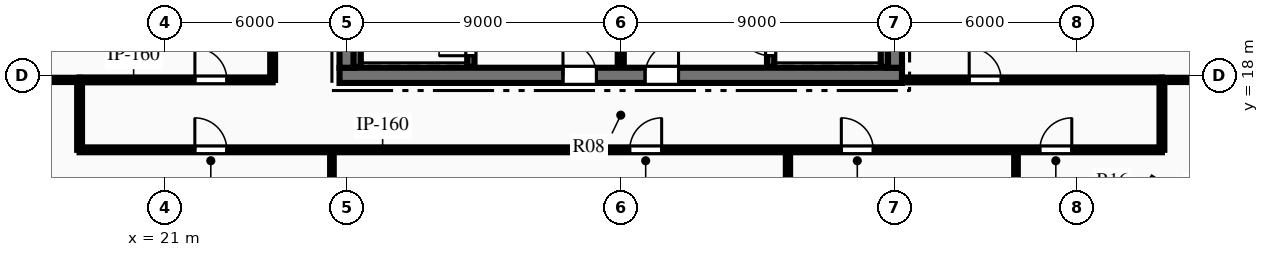
"""IFC4 building model, lengths in metres.
Left out: names, types, materials, properties, quantities, classifications, styles, units other than length and angle.
Written with IfcOpenShell. Run it as: python <this file> out.ifc"""

import sys

from ifc_helpers import new_model, si_unit, direction, frame, frame_2d, origin, place, context, subcontext, project, spatial, rectangle, extrude, element, fill, save


model = new_model("IFC4")
c1 = context("Model", 3, precision=1e-05, world=origin(), true_north=direction((0.0, 1.0)))
c2 = subcontext(c1, "Body", "Model", "MODEL_VIEW")
j1 = project(units=[si_unit("LENGTHUNIT", "METRE"), si_unit("PLANEANGLEUNIT", "RADIAN")], contexts=[c1])
p1 = place(None, origin())
s1 = spatial("IfcSite", under=j1, at=p1, CompositionType="ELEMENT")
p2 = place(p1, origin())
s2 = spatial("IfcBuilding", under=s1, at=p2, CompositionType="ELEMENT")
p3 = place(p2, frame((0.0, 0.0, 220.95)))
s3 = spatial("IfcBuildingStorey", under=s2, at=p3, CompositionType="ELEMENT", Elevation=220.95)
p4 = place(p3, frame((26.75, 18.0, 0.0), z_axis=(0.0, 0.0, 1.0), x_axis=(1.0, 0.0, 0.0)))
e1 = element("IfcWall", 1, at=p4, inside=s3, PredefinedType="SHEAR", context=c2, shape_type="SweptSolid", body=[
    extrude(rectangle(XDim=18.5, YDim=0.5, at=frame_2d((9.25, 0.0))), origin(), (0.0, 0.0, 1.0), 3.75),
])
p5 = place(p4, frame((7.35, 0.0, 0.0)))
e2 = element("IfcOpeningElement", 2, at=p5, cuts=e1, PredefinedType="OPENING", context=c2, shape_type="SweptSolid", body=[
    extrude(rectangle(XDim=1.1, YDim=2.15, at=frame_2d((0.55, 1.075))), frame((0.0, 0.26, 0.0), z_axis=(0.0, -1.0, 0.0), x_axis=(1.0, 0.0, 0.0)), (0.0, 0.0, 1.0), 0.52),
])
p6 = place(p4, frame((10.05, 0.0, 0.0)))
e3 = element("IfcOpeningElement", 3, at=p6, cuts=e1, PredefinedType="OPENING", context=c2, shape_type="SweptSolid", body=[
    extrude(rectangle(XDim=1.1, YDim=2.15, at=frame_2d((0.55, 1.075))), frame((0.0, 0.26, 0.0), z_axis=(0.0, -1.0, 0.0), x_axis=(1.0, 0.0, 0.0)), (0.0, 0.0, 1.0), 0.52),
])
p7 = place(p3, frame((27.0, 18.25, 0.0), z_axis=(0.0, 0.0, 1.0), x_axis=(0.0, 1.0, 0.0)))
e4 = element("IfcWall", 4, at=p7, inside=s3, PredefinedType="SHEAR", context=c2, shape_type="SweptSolid", body=[
    extrude(rectangle(XDim=15.5, YDim=0.5, at=frame_2d((7.75, 0.0))), origin(), (0.0, 0.0, 1.0), 3.75),
])
p8 = place(p7, frame((9.99, 0.0, 0.0)))
e5 = element("IfcOpeningElement", 5, at=p8, cuts=e4, PredefinedType="OPENING", context=c2, shape_type="SweptSolid", body=[
    extrude(rectangle(XDim=1.4, YDim=2.2, at=frame_2d((0.7, 1.1))), frame((0.0, 0.26, 0.0), z_axis=(0.0, -1.0, 0.0), x_axis=(1.0, 0.0, 0.0)), (0.0, 0.0, 1.0), 0.52),
])
p9 = place(p3, frame((45.0, 18.25, 0.0), z_axis=(0.0, 0.0, 1.0), x_axis=(0.0, 1.0, 0.0)))
e6 = element("IfcWall", 6, at=p9, inside=s3, PredefinedType="SHEAR", context=c2, shape_type="SweptSolid", body=[
    extrude(rectangle(XDim=15.5, YDim=0.5, at=frame_2d((7.75, 0.0))), origin(), (0.0, 0.0, 1.0), 3.75),
])
p10 = place(p9, frame((9.99, 0.0, 0.0)))
e7 = element("IfcOpeningElement", 7, at=p10, cuts=e6, PredefinedType="OPENING", context=c2, shape_type="SweptSolid", body=[
    extrude(rectangle(XDim=1.4, YDim=2.2, at=frame_2d((0.7, 1.1))), frame((0.0, 0.26, 0.0), z_axis=(0.0, -1.0, 0.0), x_axis=(1.0, 0.0, 0.0)), (0.0, 0.0, 1.0), 0.52),
])
p11 = place(p3, frame((31.07, 18.28, 0.0), z_axis=(0.0, 0.0, 1.0), x_axis=(0.0, 1.0, 0.0)))
e8 = element("IfcWall", 8, at=p11, inside=s3, PredefinedType="SHEAR", context=c2, shape_type="SweptSolid", body=[
    extrude(rectangle(XDim=8.26, YDim=0.24, at=frame_2d((4.13, 0.0))), origin(), (0.0, 0.0, 1.0), 3.75),
])
p12 = place(p11, frame((0.365, 0.0, 0.0)))
e9 = element("IfcOpeningElement", 9, at=p12, cuts=e8, PredefinedType="OPENING", context=c2, shape_type="SweptSolid", body=[
    extrude(rectangle(XDim=1.05, YDim=2.15, at=frame_2d((0.525, 1.075))), frame((0.0, 0.13, 0.0), z_axis=(0.0, -1.0, 0.0), x_axis=(1.0, 0.0, 0.0)), (0.0, 0.0, 1.0), 0.26),
])
p13 = place(p3, frame((27.33, 18.28, 0.0), z_axis=(0.0, 0.0, 1.0), x_axis=(0.0, 1.0, 0.0)))
e10 = element("IfcWall", 10, at=p13, inside=s3, PredefinedType="SHEAR", context=c2, shape_type="SweptSolid", body=[
    extrude(rectangle(XDim=8.26, YDim=0.24, at=frame_2d((4.13, 0.0))), origin(), (0.0, 0.0, 1.0), 3.75),
])
p14 = place(p3, frame((40.93, 18.28, 0.0), z_axis=(0.0, 0.0, 1.0), x_axis=(0.0, 1.0, 0.0)))
e11 = element("IfcWall", 11, at=p14, inside=s3, PredefinedType="SHEAR", context=c2, shape_type="SweptSolid", body=[
    extrude(rectangle(XDim=8.26, YDim=0.24, at=frame_2d((4.13, 0.0))), origin(), (0.0, 0.0, 1.0), 3.75),
])
p15 = place(p14, frame((0.365, 0.0, 0.0)))
e12 = element("IfcOpeningElement", 12, at=p15, cuts=e11, PredefinedType="OPENING", context=c2, shape_type="SweptSolid", body=[
    extrude(rectangle(XDim=1.05, YDim=2.15, at=frame_2d((0.525, 1.075))), frame((0.0, 0.13, 0.0), z_axis=(0.0, -1.0, 0.0), x_axis=(1.0, 0.0, 0.0)), (0.0, 0.0, 1.0), 0.26),
])
p16 = place(p3, frame((44.67, 18.28, 0.0), z_axis=(0.0, 0.0, 1.0), x_axis=(0.0, 1.0, 0.0)))
e13 = element("IfcWall", 13, at=p16, inside=s3, PredefinedType="SHEAR", context=c2, shape_type="SweptSolid", body=[
    extrude(rectangle(XDim=8.26, YDim=0.24, at=frame_2d((4.13, 0.0))), origin(), (0.0, 0.0, 1.0), 3.75),
])
p17 = place(p3, frame((36.0, 18.28, 0.0), z_axis=(0.0, 0.0, 1.0), x_axis=(0.0, 1.0, 0.0)))
e14 = element("IfcWall", 14, at=p17, inside=s3, PredefinedType="PARTITIONING", context=c2, shape_type="SweptSolid", body=[
    extrude(rectangle(XDim=3.77, YDim=0.2, at=frame_2d((1.885, 0.0))), origin(), (0.0, 0.0, 1.0), 3.47),
])
p18 = place(p3, frame((18.2, 15.55, 0.0), z_axis=(0.0, 0.0, 1.0), x_axis=(1.0, 0.0, 0.0)))
e15 = element("IfcWall", 15, at=p18, inside=s3, PredefinedType="PARTITIONING", context=c2, shape_type="SweptSolid", body=[
    extrude(rectangle(XDim=35.6, YDim=0.16, at=frame_2d((17.8, 0.0))), origin(), (0.0, 0.0, 1.0), 2.849),
])
p19 = place(p18, frame((3.791, 0.0, 0.0)))
e16 = element("IfcOpeningElement", 16, at=p19, cuts=e15, PredefinedType="OPENING", context=c2, shape_type="SweptSolid", body=[
    extrude(rectangle(XDim=1.05, YDim=2.15, at=frame_2d((0.525, 1.075))), frame((0.0, 0.09, 0.0), z_axis=(0.0, -1.0, 0.0), x_axis=(1.0, 0.0, 0.0)), (0.0, 0.0, 1.0), 0.18),
])
p20 = place(p18, frame((18.095, 0.0, 0.0)))
e17 = element("IfcOpeningElement", 17, at=p20, cuts=e15, PredefinedType="OPENING", context=c2, shape_type="SweptSolid", body=[
    extrude(rectangle(XDim=1.05, YDim=2.15, at=frame_2d((0.525, 1.075))), frame((0.0, 0.09, 0.0), z_axis=(0.0, -1.0, 0.0), x_axis=(1.0, 0.0, 0.0)), (0.0, 0.0, 1.0), 0.18),
])
p21 = place(p18, frame((25.055, 0.0, 0.0)))
e18 = element("IfcOpeningElement", 18, at=p21, cuts=e15, PredefinedType="OPENING", context=c2, shape_type="SweptSolid", body=[
    extrude(rectangle(XDim=1.05, YDim=2.15, at=frame_2d((0.525, 1.075))), frame((0.0, 0.09, 0.0), z_axis=(0.0, -1.0, 0.0), x_axis=(1.0, 0.0, 0.0)), (0.0, 0.0, 1.0), 0.18),
])
p22 = place(p18, frame((31.585, 0.0, 0.0)))
e19 = element("IfcOpeningElement", 19, at=p22, cuts=e15, PredefinedType="OPENING", context=c2, shape_type="SweptSolid", body=[
    extrude(rectangle(XDim=1.05, YDim=2.15, at=frame_2d((0.525, 1.075))), frame((0.0, 0.09, 0.0), z_axis=(0.0, -1.0, 0.0), x_axis=(1.0, 0.0, 0.0)), (0.0, 0.0, 1.0), 0.18),
])
p23 = place(p3, frame((18.2, 17.85, 0.0), z_axis=(0.0, 0.0, 1.0), x_axis=(1.0, 0.0, 0.0)))
e20 = element("IfcWall", 20, at=p23, inside=s3, PredefinedType="PARTITIONING", context=c2, shape_type="SweptSolid", body=[
    extrude(rectangle(XDim=6.35, YDim=0.16, at=frame_2d((3.175, 0.0))), origin(), (0.0, 0.0, 1.0), 3.47),
])
p24 = place(p23, frame((3.793, 0.0, 0.0)))
e21 = element("IfcOpeningElement", 21, at=p24, cuts=e20, PredefinedType="OPENING", context=c2, shape_type="SweptSolid", body=[
    extrude(rectangle(XDim=1.05, YDim=2.15, at=frame_2d((0.525, 1.075))), frame((0.0, 0.09, 0.0), z_axis=(0.0, -1.0, 0.0), x_axis=(1.0, 0.0, 0.0)), (0.0, 0.0, 1.0), 0.18),
])
p25 = place(p3, frame((45.25, 17.85, 0.0), z_axis=(0.0, 0.0, 1.0), x_axis=(1.0, 0.0, 0.0)))
e22 = element("IfcWall", 22, at=p25, inside=s3, PredefinedType="PARTITIONING", context=c2, shape_type="SweptSolid", body=[
    extrude(rectangle(XDim=8.55, YDim=0.16, at=frame_2d((4.275, 0.0))), origin(), (0.0, 0.0, 1.0), 3.47),
])
p26 = place(p25, frame((2.211, 0.0, 0.0)))
e23 = element("IfcOpeningElement", 23, at=p26, cuts=e22, PredefinedType="OPENING", context=c2, shape_type="SweptSolid", body=[
    extrude(rectangle(XDim=1.05, YDim=2.15, at=frame_2d((0.525, 1.075))), frame((0.0, 0.09, 0.0), z_axis=(0.0, -1.0, 0.0), x_axis=(1.0, 0.0, 0.0)), (0.0, 0.0, 1.0), 0.18),
])
p27 = place(p3, frame((24.55, 17.85, 0.0), z_axis=(0.0, 0.0, 1.0), x_axis=(0.0, 1.0, 0.0)))
e24 = element("IfcWall", 24, at=p27, inside=s3, PredefinedType="PARTITIONING", context=c2, shape_type="SweptSolid", body=[
    extrude(rectangle(XDim=16.3, YDim=0.16, at=frame_2d((8.15, 0.0))), origin(), (0.0, 0.0, 1.0), 3.47),
])
p28 = place(p27, frame((5.775, 0.0, 0.0)))
e25 = element("IfcOpeningElement", 25, at=p28, cuts=e24, PredefinedType="OPENING", context=c2, shape_type="SweptSolid", body=[
    extrude(rectangle(XDim=1.05, YDim=2.15, at=frame_2d((0.525, 1.075))), frame((0.0, 0.09, 0.0), z_axis=(0.0, -1.0, 0.0), x_axis=(1.0, 0.0, 0.0)), (0.0, 0.0, 1.0), 0.18),
])
p29 = place(p27, frame((9.777, 0.0, 0.0)))
e26 = element("IfcOpeningElement", 26, at=p29, cuts=e24, PredefinedType="OPENING", context=c2, shape_type="SweptSolid", body=[
    extrude(rectangle(XDim=1.05, YDim=2.15, at=frame_2d((0.525, 1.075))), frame((0.0, 0.09, 0.0), z_axis=(0.0, -1.0, 0.0), x_axis=(1.0, 0.0, 0.0)), (0.0, 0.0, 1.0), 0.18),
])
for number, where, z_axis, x_axis in (
    (27, (18.2, 15.55, 0.0), (0.0, 0.0, 1.0), (0.0, 1.0, 0.0)),
    (28, (53.8, 15.55, 0.0), (0.0, 0.0, 1.0), (0.0, 1.0, 0.0)),
):
    element("IfcWall", number, at=place(p3, frame(where, z_axis=z_axis, x_axis=x_axis)), inside=s3, PredefinedType="PARTITIONING", context=c2, shape_type="SweptSolid", body=[
        extrude(rectangle(XDim=2.3, YDim=0.16, at=frame_2d((1.15, 0.0))), origin(), (0.0, 0.0, 1.0), 3.47),
    ])
p30 = place(p3, frame((8.979, 17.85, 0.0), z_axis=(0.0, 0.0, 1.0), x_axis=(1.0, 0.0, 0.0)))
e29 = element("IfcWall", 29, at=p30, inside=s3, PredefinedType="PARTITIONING", context=c2, shape_type="SweptSolid", body=[
    extrude(rectangle(XDim=9.221, YDim=0.14, at=frame_2d((4.61, 0.0))), origin(), (0.0, 0.0, 1.0), 3.47),
])
p31 = place(p3, frame((53.8, 17.85, 0.0), z_axis=(0.0, 0.0, 1.0), x_axis=(1.0, 0.0, 0.0)))
e30 = element("IfcWall", 30, at=p31, inside=s3, PredefinedType="PARTITIONING", context=c2, shape_type="SweptSolid", body=[
    extrude(rectangle(XDim=4.616, YDim=0.14, at=frame_2d((2.308, 0.0))), origin(), (0.0, 0.0, 1.0), 3.47),
])
p32 = place(p3, frame((26.5, 3.702, 0.0), z_axis=(0.0, 0.0, 1.0), x_axis=(0.0, 1.0, 0.0)))
e31 = element("IfcWall", 31, at=p32, inside=s3, PredefinedType="PARTITIONING", context=c2, shape_type="SweptSolid", body=[
    extrude(rectangle(XDim=11.848, YDim=0.12, at=frame_2d((5.924, 0.0))), origin(), (0.0, 0.0, 1.0), 2.849),
])
p33 = place(p3, frame((41.5, -1.445, 0.0), z_axis=(0.0, 0.0, 1.0), x_axis=(0.0, 1.0, 0.0)))
e32 = element("IfcWall", 32, at=p33, inside=s3, PredefinedType="PARTITIONING", context=c2, shape_type="SweptSolid", body=[
    extrude(rectangle(XDim=16.995, YDim=0.14, at=frame_2d((8.498, 0.0))), origin(), (0.0, 0.0, 1.0), 3.47),
])
p34 = place(p3, frame((49.0, 3.069, 0.0), z_axis=(0.0, 0.0, 1.0), x_axis=(0.0, 1.0, 0.0)))
e33 = element("IfcWall", 33, at=p34, inside=s3, PredefinedType="PARTITIONING", context=c2, shape_type="SweptSolid", body=[
    extrude(rectangle(XDim=12.481, YDim=0.12, at=frame_2d((6.241, 0.0))), origin(), (0.0, 0.0, 1.0), 3.47),
])
p35 = place(p12, origin())
e34 = element("IfcDoor", 34, at=p35, inside=s3, OperationType="SINGLE_SWING_LEFT", PredefinedType="DOOR", context=c2, shape_type="SweptSolid", body=[
    extrude(rectangle(XDim=1.05, YDim=2.15, at=frame_2d((0.525, 1.075))), frame((0.0, 0.025, 0.0), z_axis=(0.0, -1.0, 0.0), x_axis=(1.0, 0.0, 0.0)), (0.0, 0.0, 1.0), 0.05),
])
fill(e9, e34)
p36 = place(p15, origin())
e35 = element("IfcDoor", 35, at=p36, inside=s3, OperationType="SINGLE_SWING_RIGHT", PredefinedType="DOOR", context=c2, shape_type="SweptSolid", body=[
    extrude(rectangle(XDim=1.05, YDim=2.15, at=frame_2d((0.525, 1.075))), frame((0.0, 0.025, 0.0), z_axis=(0.0, -1.0, 0.0), x_axis=(1.0, 0.0, 0.0)), (0.0, 0.0, 1.0), 0.05),
])
fill(e12, e35)
p37 = place(p5, origin())
e36 = element("IfcDoor", 36, at=p37, inside=s3, OperationType="SINGLE_SWING_LEFT", PredefinedType="DOOR", context=c2, shape_type="SweptSolid", body=[
    extrude(rectangle(XDim=1.1, YDim=2.15, at=frame_2d((0.55, 1.075))), frame((0.0, 0.025, 0.0), z_axis=(0.0, -1.0, 0.0), x_axis=(1.0, 0.0, 0.0)), (0.0, 0.0, 1.0), 0.05),
])
fill(e2, e36)
p38 = place(p6, origin())
e37 = element("IfcDoor", 37, at=p38, inside=s3, OperationType="SINGLE_SWING_RIGHT", PredefinedType="DOOR", context=c2, shape_type="SweptSolid", body=[
    extrude(rectangle(XDim=1.1, YDim=2.15, at=frame_2d((0.55, 1.075))), frame((0.0, 0.025, 0.0), z_axis=(0.0, -1.0, 0.0), x_axis=(1.0, 0.0, 0.0)), (0.0, 0.0, 1.0), 0.05),
])
fill(e3, e37)
p39 = place(p19, origin())
e38 = element("IfcDoor", 38, at=p39, inside=s3, OperationType="SINGLE_SWING_LEFT", PredefinedType="DOOR", context=c2, shape_type="SweptSolid", body=[
    extrude(rectangle(XDim=1.05, YDim=2.15, at=frame_2d((0.525, 1.075))), frame((0.0, 0.025, 0.0), z_axis=(0.0, -1.0, 0.0), x_axis=(1.0, 0.0, 0.0)), (0.0, 0.0, 1.0), 0.05),
])
fill(e16, e38)
p40 = place(p20, origin())
e39 = element("IfcDoor", 39, at=p40, inside=s3, OperationType="SINGLE_SWING_RIGHT", PredefinedType="DOOR", context=c2, shape_type="SweptSolid", body=[
    extrude(rectangle(XDim=1.05, YDim=2.15, at=frame_2d((0.525, 1.075))), frame((0.0, 0.025, 0.0), z_axis=(0.0, -1.0, 0.0), x_axis=(1.0, 0.0, 0.0)), (0.0, 0.0, 1.0), 0.05),
])
fill(e17, e39)
p41 = place(p21, origin())
e40 = element("IfcDoor", 40, at=p41, inside=s3, OperationType="SINGLE_SWING_LEFT", PredefinedType="DOOR", context=c2, shape_type="SweptSolid", body=[
    extrude(rectangle(XDim=1.05, YDim=2.15, at=frame_2d((0.525, 1.075))), frame((0.0, 0.025, 0.0), z_axis=(0.0, -1.0, 0.0), x_axis=(1.0, 0.0, 0.0)), (0.0, 0.0, 1.0), 0.05),
])
fill(e18, e40)
p42 = place(p22, origin())
e41 = element("IfcDoor", 41, at=p42, inside=s3, OperationType="SINGLE_SWING_RIGHT", PredefinedType="DOOR", context=c2, shape_type="SweptSolid", body=[
    extrude(rectangle(XDim=1.05, YDim=2.15, at=frame_2d((0.525, 1.075))), frame((0.0, 0.025, 0.0), z_axis=(0.0, -1.0, 0.0), x_axis=(1.0, 0.0, 0.0)), (0.0, 0.0, 1.0), 0.05),
])
fill(e19, e41)
p43 = place(p24, origin())
e42 = element("IfcDoor", 42, at=p43, inside=s3, OperationType="SINGLE_SWING_LEFT", PredefinedType="DOOR", context=c2, shape_type="SweptSolid", body=[
    extrude(rectangle(XDim=1.05, YDim=2.15, at=frame_2d((0.525, 1.075))), frame((0.0, 0.025, 0.0), z_axis=(0.0, -1.0, 0.0), x_axis=(1.0, 0.0, 0.0)), (0.0, 0.0, 1.0), 0.05),
])
fill(e21, e42)
p44 = place(p26, origin())
e43 = element("IfcDoor", 43, at=p44, inside=s3, OperationType="SINGLE_SWING_LEFT", PredefinedType="DOOR", context=c2, shape_type="SweptSolid", body=[
    extrude(rectangle(XDim=1.05, YDim=2.15, at=frame_2d((0.525, 1.075))), frame((0.0, 0.025, 0.0), z_axis=(0.0, -1.0, 0.0), x_axis=(1.0, 0.0, 0.0)), (0.0, 0.0, 1.0), 0.05),
])
fill(e23, e43)
save(model, sys.argv[1])
